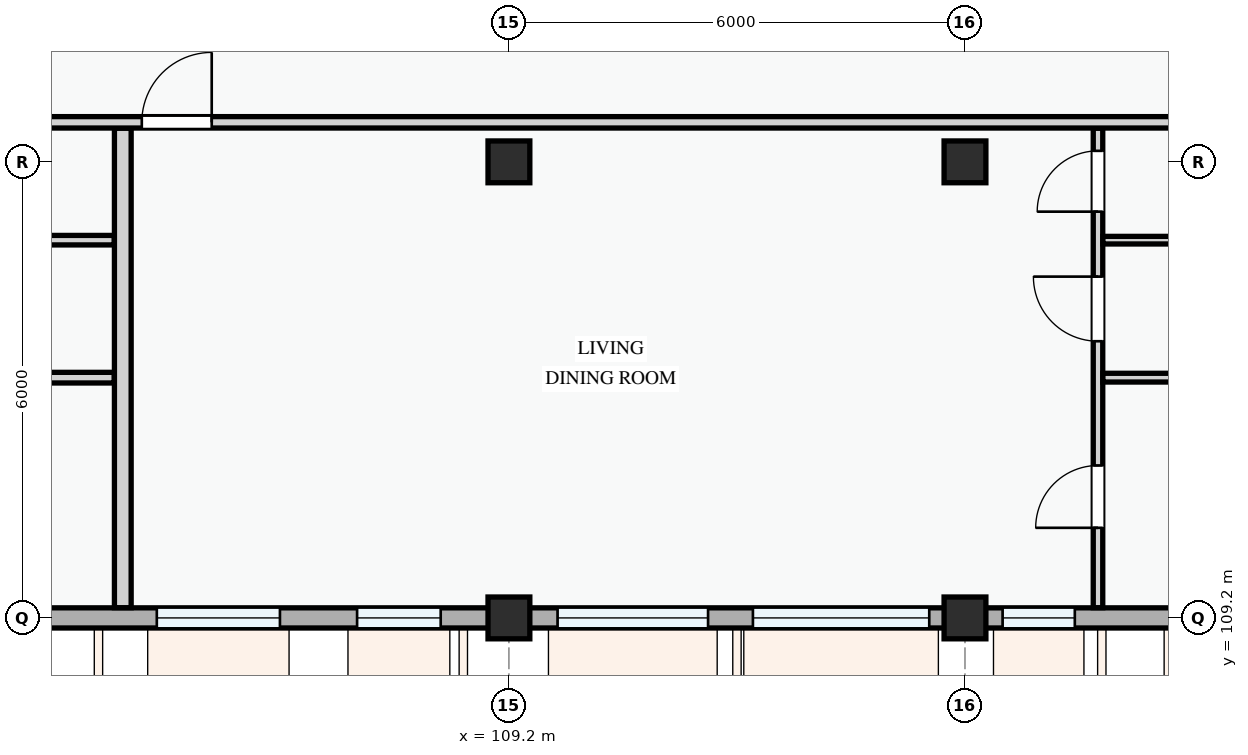
"""IFC4 building model, lengths in metres.
Left out: names, types, materials, properties, quantities, classifications, styles, units other than length and angle.
Written with IfcOpenShell. Run it as: python <this file> out.ifc"""

import sys

from ifc_helpers import new_model, si_unit, direction, frame, frame_2d, origin, origin_2d, place, context, subcontext, project, spatial, rectangle, extrude, element, fill, save


model = new_model("IFC4")
c1 = context("Model", 3, precision=1e-05, world=origin(), true_north=direction((0.0, 1.0)))
c2 = subcontext(c1, "Body", "Model", "MODEL_VIEW")
j1 = project(units=[si_unit("LENGTHUNIT", "METRE"), si_unit("PLANEANGLEUNIT", "RADIAN")], contexts=[c1])
p1 = place(None, origin())
s1 = spatial("IfcSite", under=j1, at=p1, CompositionType="ELEMENT")
p2 = place(p1, origin())
s2 = spatial("IfcBuilding", under=s1, at=p2, CompositionType="ELEMENT")
p3 = place(p2, frame((0.0, 0.0, 31.2)))
s3 = spatial("IfcBuildingStorey", under=s2, at=p3, CompositionType="ELEMENT", Elevation=31.2)
for number, where, z_axis, x_axis in (
    (1, (109.2, 109.2, 0.0), (0.0, 0.0, 1.0), (1.0, 0.0, 0.0)),
    (2, (109.2, 115.2, 0.0), (0.0, 0.0, 1.0), (1.0, 0.0, 0.0)),
    (3, (115.2, 109.2, 0.0), (0.0, 0.0, 1.0), (1.0, 0.0, 0.0)),
    (4, (115.2, 115.2, 0.0), (0.0, 0.0, 1.0), (1.0, 0.0, 0.0)),
):
    element("IfcColumn", number, at=place(p3, frame(where, z_axis=z_axis, x_axis=x_axis)), inside=s3, PredefinedType="COLUMN", context=c2, shape_type="SweptSolid", body=[
        extrude(rectangle(XDim=0.55, YDim=0.55, at=origin_2d()), origin(), (0.0, 0.0, 1.0), 3.3),
    ])
p4 = place(p3, frame((100.8, 109.2, 0.0), z_axis=(0.0, 0.0, 1.0), x_axis=(1.0, 0.0, 0.0)))
e5 = element("IfcWall", 5, at=p4, inside=s3, PredefinedType="STANDARD", context=c2, shape_type="SweptSolid", body=[
    extrude(rectangle(XDim=8.4, YDim=0.265, at=frame_2d((4.2, 0.0))), origin(), (0.0, 0.0, 1.0), 2.375),
])
p5 = place(p4, frame((1.255, 0.0, 0.78)))
e6 = element("IfcOpeningElement", 6, at=p5, cuts=e5, PredefinedType="OPENING", context=c2, shape_type="SweptSolid", body=[
    extrude(rectangle(XDim=1.0, YDim=1.25, at=frame_2d((0.5, 0.625))), frame((0.0, 0.143, 0.0), z_axis=(0.0, -1.0, 0.0), x_axis=(1.0, 0.0, 0.0)), (0.0, 0.0, 1.0), 0.285),
])
p6 = place(p4, frame((3.768, 0.0, 0.78)))
e7 = element("IfcOpeningElement", 7, at=p6, cuts=e5, PredefinedType="OPENING", context=c2, shape_type="SweptSolid", body=[
    extrude(rectangle(XDim=1.62, YDim=1.38, at=frame_2d((0.81, 0.69))), frame((0.0, 0.143, 0.0), z_axis=(0.0, -1.0, 0.0), x_axis=(1.0, 0.0, 0.0)), (0.0, 0.0, 1.0), 0.285),
])
p7 = place(p4, frame((6.403, 0.0, 0.78)))
e8 = element("IfcOpeningElement", 8, at=p7, cuts=e5, PredefinedType="OPENING", context=c2, shape_type="SweptSolid", body=[
    extrude(rectangle(XDim=1.1, YDim=1.3, at=frame_2d((0.55, 0.65))), frame((0.0, 0.143, 0.0), z_axis=(0.0, -1.0, 0.0), x_axis=(1.0, 0.0, 0.0)), (0.0, 0.0, 1.0), 0.285),
])
p8 = place(p3, frame((109.2, 109.2, 0.0), z_axis=(0.0, 0.0, 1.0), x_axis=(1.0, 0.0, 0.0)))
e9 = element("IfcWall", 9, at=p8, inside=s3, PredefinedType="STANDARD", context=c2, shape_type="SweptSolid", body=[
    extrude(rectangle(XDim=6.0, YDim=0.265, at=frame_2d((3.0, 0.0))), origin(), (0.0, 0.0, 1.0), 2.525),
])
p9 = place(p8, frame((0.64, 0.0, 0.78)))
e10 = element("IfcOpeningElement", 10, at=p9, cuts=e9, PredefinedType="OPENING", context=c2, shape_type="SweptSolid", body=[
    extrude(rectangle(XDim=1.98, YDim=1.5, at=frame_2d((0.99, 0.75))), frame((0.0, 0.143, 0.0), z_axis=(0.0, -1.0, 0.0), x_axis=(1.0, 0.0, 0.0)), (0.0, 0.0, 1.0), 0.285),
])
p10 = place(p8, frame((3.21, 0.0, 0.78)))
e11 = element("IfcOpeningElement", 11, at=p10, cuts=e9, PredefinedType="OPENING", context=c2, shape_type="SweptSolid", body=[
    extrude(rectangle(XDim=2.32, YDim=1.5, at=frame_2d((1.16, 0.75))), frame((0.0, 0.143, 0.0), z_axis=(0.0, -1.0, 0.0), x_axis=(1.0, 0.0, 0.0)), (0.0, 0.0, 1.0), 0.285),
])
p11 = place(p3, frame((115.2, 109.2, 0.0), z_axis=(0.0, 0.0, 1.0), x_axis=(1.0, 0.0, 0.0)))
e12 = element("IfcWall", 12, at=p11, inside=s3, PredefinedType="STANDARD", context=c2, shape_type="SweptSolid", body=[
    extrude(rectangle(XDim=8.4, YDim=0.265, at=frame_2d((4.2, 0.0))), origin(), (0.0, 0.0, 1.0), 2.375),
])
p12 = place(p11, frame((0.495, 0.0, 0.78)))
e13 = element("IfcOpeningElement", 13, at=p12, cuts=e12, PredefinedType="OPENING", context=c2, shape_type="SweptSolid", body=[
    extrude(rectangle(XDim=0.95, YDim=1.15, at=frame_2d((0.475, 0.575))), frame((0.0, 0.143, 0.0), z_axis=(0.0, -1.0, 0.0), x_axis=(1.0, 0.0, 0.0)), (0.0, 0.0, 1.0), 0.285),
])
p13 = place(p11, frame((2.74, 0.0, 0.78)))
e14 = element("IfcOpeningElement", 14, at=p13, cuts=e12, PredefinedType="OPENING", context=c2, shape_type="SweptSolid", body=[
    extrude(rectangle(XDim=1.32, YDim=1.35, at=frame_2d((0.66, 0.675))), frame((0.0, 0.143, 0.0), z_axis=(0.0, -1.0, 0.0), x_axis=(1.0, 0.0, 0.0)), (0.0, 0.0, 1.0), 0.285),
])
p14 = place(p11, frame((5.67, 0.0, 0.78)))
e15 = element("IfcOpeningElement", 15, at=p14, cuts=e12, PredefinedType="OPENING", context=c2, shape_type="SweptSolid", body=[
    extrude(rectangle(XDim=1.78, YDim=1.42, at=frame_2d((0.89, 0.71))), frame((0.0, 0.143, 0.0), z_axis=(0.0, -1.0, 0.0), x_axis=(1.0, 0.0, 0.0)), (0.0, 0.0, 1.0), 0.285),
])
p15 = place(p3, frame((92.342, 112.361, 0.0), z_axis=(0.0, 0.0, 1.0), x_axis=(1.0, 0.0, 0.0)))
e16 = element("IfcWall", 16, at=p15, inside=s3, PredefinedType="PARTITIONING", context=c2, shape_type="SweptSolid", body=[
    extrude(rectangle(XDim=11.666, YDim=0.14, at=frame_2d((5.833, 0.0))), origin(), (0.0, 0.0, 1.0), 3.0),
])
p16 = place(p3, frame((92.342, 114.17, 0.0), z_axis=(0.0, 0.0, 1.0), x_axis=(1.0, 0.0, 0.0)))
e17 = element("IfcWall", 17, at=p16, inside=s3, PredefinedType="PARTITIONING", context=c2, shape_type="SweptSolid", body=[
    extrude(rectangle(XDim=11.666, YDim=0.125, at=frame_2d((5.833, 0.0))), origin(), (0.0, 0.0, 1.0), 3.0),
])
p17 = place(p3, frame((116.95, 109.334, 0.0), z_axis=(0.0, 0.0, 1.0), x_axis=(0.0, 1.0, 0.0)))
e18 = element("IfcWall", 18, at=p17, inside=s3, PredefinedType="PARTITIONING", context=c2, shape_type="SweptSolid", body=[
    extrude(rectangle(XDim=6.309, YDim=0.125, at=frame_2d((3.154, 0.0))), origin(), (0.0, 0.0, 1.0), 3.0),
])
p18 = place(p17, frame((1.051, 0.0, 0.0)))
e19 = element("IfcOpeningElement", 19, at=p18, cuts=e18, PredefinedType="OPENING", context=c2, shape_type="SweptSolid", body=[
    extrude(rectangle(XDim=0.82, YDim=2.08, at=frame_2d((0.41, 1.04))), frame((0.0, 0.073, 0.0), z_axis=(0.0, -1.0, 0.0), x_axis=(1.0, 0.0, 0.0)), (0.0, 0.0, 1.0), 0.145),
])
p19 = place(p17, frame((3.506, 0.0, 0.0)))
e20 = element("IfcOpeningElement", 20, at=p19, cuts=e18, PredefinedType="OPENING", context=c2, shape_type="SweptSolid", body=[
    extrude(rectangle(XDim=0.85, YDim=2.1, at=frame_2d((0.425, 1.05))), frame((0.0, 0.073, 0.0), z_axis=(0.0, -1.0, 0.0), x_axis=(1.0, 0.0, 0.0)), (0.0, 0.0, 1.0), 0.145),
])
p20 = place(p17, frame((5.21, 0.0, 0.0)))
e21 = element("IfcOpeningElement", 21, at=p20, cuts=e18, PredefinedType="OPENING", context=c2, shape_type="SweptSolid", body=[
    extrude(rectangle(XDim=0.8, YDim=2.1, at=frame_2d((0.4, 1.05))), frame((0.0, 0.073, 0.0), z_axis=(0.0, -1.0, 0.0), x_axis=(1.0, 0.0, 0.0)), (0.0, 0.0, 1.0), 0.145),
])
p21 = place(p3, frame((117.014, 112.361, 0.0), z_axis=(0.0, 0.0, 1.0), x_axis=(1.0, 0.0, 0.0)))
e22 = element("IfcWall", 22, at=p21, inside=s3, PredefinedType="PARTITIONING", context=c2, shape_type="SweptSolid", body=[
    extrude(rectangle(XDim=10.664, YDim=0.115, at=frame_2d((5.332, 0.0))), origin(), (0.0, 0.0, 1.0), 3.0),
])
p22 = place(p3, frame((117.014, 114.17, 0.0), z_axis=(0.0, 0.0, 1.0), x_axis=(1.0, 0.0, 0.0)))
e23 = element("IfcWall", 23, at=p22, inside=s3, PredefinedType="PARTITIONING", context=c2, shape_type="SweptSolid", body=[
    extrude(rectangle(XDim=10.664, YDim=0.1, at=frame_2d((5.332, 0.0))), origin(), (0.0, 0.0, 1.0), 3.0),
])
p23 = place(p3, frame((104.12, 109.334, 0.0), z_axis=(0.0, 0.0, 1.0), x_axis=(0.0, 1.0, 0.0)))
e24 = element("IfcWall", 24, at=p23, inside=s3, PredefinedType="PARTITIONING", context=c2, shape_type="SweptSolid", body=[
    extrude(rectangle(XDim=6.309, YDim=0.22, at=frame_2d((3.154, 0.0))), origin(), (0.0, 0.0, 1.0), 3.0),
])
p24 = place(p3, frame((80.534, 115.72, 0.0), z_axis=(0.0, 0.0, 1.0), x_axis=(1.0, 0.0, 0.0)))
e25 = element("IfcWall", 25, at=p24, inside=s3, PredefinedType="PARTITIONING", context=c2, shape_type="SweptSolid", body=[
    extrude(rectangle(XDim=69.516, YDim=0.15, at=frame_2d((34.758, 0.0))), origin(), (0.0, 0.0, 1.0), 3.0),
])
p25 = place(p24, frame((9.573, 0.0, 0.0)))
e26 = element("IfcOpeningElement", 26, at=p25, cuts=e25, PredefinedType="OPENING", context=c2, shape_type="SweptSolid", body=[
    extrude(rectangle(XDim=0.96, YDim=2.12, at=frame_2d((0.48, 1.06))), frame((0.0, 0.085, 0.0), z_axis=(0.0, -1.0, 0.0), x_axis=(1.0, 0.0, 0.0)), (0.0, 0.0, 1.0), 0.17),
])
p26 = place(p24, frame((23.835, 0.0, 0.0)))
e27 = element("IfcOpeningElement", 27, at=p26, cuts=e25, PredefinedType="OPENING", context=c2, shape_type="SweptSolid", body=[
    extrude(rectangle(XDim=0.92, YDim=2.1, at=frame_2d((0.46, 1.05))), frame((0.0, 0.085, 0.0), z_axis=(0.0, -1.0, 0.0), x_axis=(1.0, 0.0, 0.0)), (0.0, 0.0, 1.0), 0.17),
])
p27 = place(p24, frame((52.783, 0.0, 0.0)))
e28 = element("IfcOpeningElement", 28, at=p27, cuts=e25, PredefinedType="OPENING", context=c2, shape_type="SweptSolid", body=[
    extrude(rectangle(XDim=0.92, YDim=2.1, at=frame_2d((0.46, 1.05))), frame((0.0, 0.085, 0.0), z_axis=(0.0, -1.0, 0.0), x_axis=(1.0, 0.0, 0.0)), (0.0, 0.0, 1.0), 0.17),
])
p28 = place(p6, origin())
e29 = element("IfcWindow", 29, at=p28, inside=s3, PartitioningType="DOUBLE_PANEL_VERTICAL", PredefinedType="WINDOW", context=c2, shape_type="SweptSolid", body=[
    extrude(rectangle(XDim=1.62, YDim=1.38, at=frame_2d((0.81, 0.69))), frame((0.0, 0.03, 0.0), z_axis=(0.0, -1.0, 0.0), x_axis=(1.0, 0.0, 0.0)), (0.0, 0.0, 1.0), 0.06),
])
fill(e7, e29)
p29 = place(p7, origin())
e30 = element("IfcWindow", 30, at=p29, inside=s3, PartitioningType="SINGLE_PANEL", PredefinedType="WINDOW", context=c2, shape_type="SweptSolid", body=[
    extrude(rectangle(XDim=1.1, YDim=1.3, at=frame_2d((0.55, 0.65))), frame((0.0, 0.03, 0.0), z_axis=(0.0, -1.0, 0.0), x_axis=(1.0, 0.0, 0.0)), (0.0, 0.0, 1.0), 0.06),
])
fill(e8, e30)
p30 = place(p9, origin())
e31 = element("IfcWindow", 31, at=p30, inside=s3, PartitioningType="DOUBLE_PANEL_VERTICAL", PredefinedType="WINDOW", context=c2, shape_type="SweptSolid", body=[
    extrude(rectangle(XDim=1.98, YDim=1.5, at=frame_2d((0.99, 0.75))), frame((0.0, 0.03, 0.0), z_axis=(0.0, -1.0, 0.0), x_axis=(1.0, 0.0, 0.0)), (0.0, 0.0, 1.0), 0.06),
])
fill(e10, e31)
p31 = place(p10, origin())
e32 = element("IfcWindow", 32, at=p31, inside=s3, PartitioningType="DOUBLE_PANEL_VERTICAL", PredefinedType="WINDOW", context=c2, shape_type="SweptSolid", body=[
    extrude(rectangle(XDim=2.32, YDim=1.5, at=frame_2d((1.16, 0.75))), frame((0.0, 0.03, 0.0), z_axis=(0.0, -1.0, 0.0), x_axis=(1.0, 0.0, 0.0)), (0.0, 0.0, 1.0), 0.06),
])
fill(e11, e32)
p32 = place(p12, origin())
e33 = element("IfcWindow", 33, at=p32, inside=s3, PartitioningType="SINGLE_PANEL", PredefinedType="WINDOW", context=c2, shape_type="SweptSolid", body=[
    extrude(rectangle(XDim=0.95, YDim=1.15, at=frame_2d((0.475, 0.575))), frame((0.0, 0.03, 0.0), z_axis=(0.0, -1.0, 0.0), x_axis=(1.0, 0.0, 0.0)), (0.0, 0.0, 1.0), 0.06),
])
fill(e13, e33)
p33 = place(p18, origin())
e34 = element("IfcDoor", 34, at=p33, inside=s3, OperationType="SINGLE_SWING_LEFT", PredefinedType="DOOR", context=c2, shape_type="SweptSolid", body=[
    extrude(rectangle(XDim=0.82, YDim=2.08, at=frame_2d((0.41, 1.04))), frame((0.0, 0.025, 0.0), z_axis=(0.0, -1.0, 0.0), x_axis=(1.0, 0.0, 0.0)), (0.0, 0.0, 1.0), 0.05),
])
fill(e19, e34)
p34 = place(p19, origin())
e35 = element("IfcDoor", 35, at=p34, inside=s3, OperationType="SINGLE_SWING_RIGHT", PredefinedType="DOOR", context=c2, shape_type="SweptSolid", body=[
    extrude(rectangle(XDim=0.85, YDim=2.1, at=frame_2d((0.425, 1.05))), frame((0.0, 0.025, 0.0), z_axis=(0.0, -1.0, 0.0), x_axis=(1.0, 0.0, 0.0)), (0.0, 0.0, 1.0), 0.05),
])
fill(e20, e35)
p35 = place(p20, origin())
e36 = element("IfcDoor", 36, at=p35, inside=s3, OperationType="SINGLE_SWING_LEFT", PredefinedType="DOOR", context=c2, shape_type="SweptSolid", body=[
    extrude(rectangle(XDim=0.8, YDim=2.1, at=frame_2d((0.4, 1.05))), frame((0.0, 0.025, 0.0), z_axis=(0.0, -1.0, 0.0), x_axis=(1.0, 0.0, 0.0)), (0.0, 0.0, 1.0), 0.05),
])
fill(e21, e36)
p36 = place(p26, origin())
e37 = element("IfcDoor", 37, at=p36, inside=s3, OperationType="SINGLE_SWING_RIGHT", PredefinedType="DOOR", context=c2, shape_type="SweptSolid", body=[
    extrude(rectangle(XDim=0.92, YDim=2.1, at=frame_2d((0.46, 1.05))), frame((0.0, 0.025, 0.0), z_axis=(0.0, -1.0, 0.0), x_axis=(1.0, 0.0, 0.0)), (0.0, 0.0, 1.0), 0.05),
])
fill(e27, e37)
save(model, sys.argv[1])
